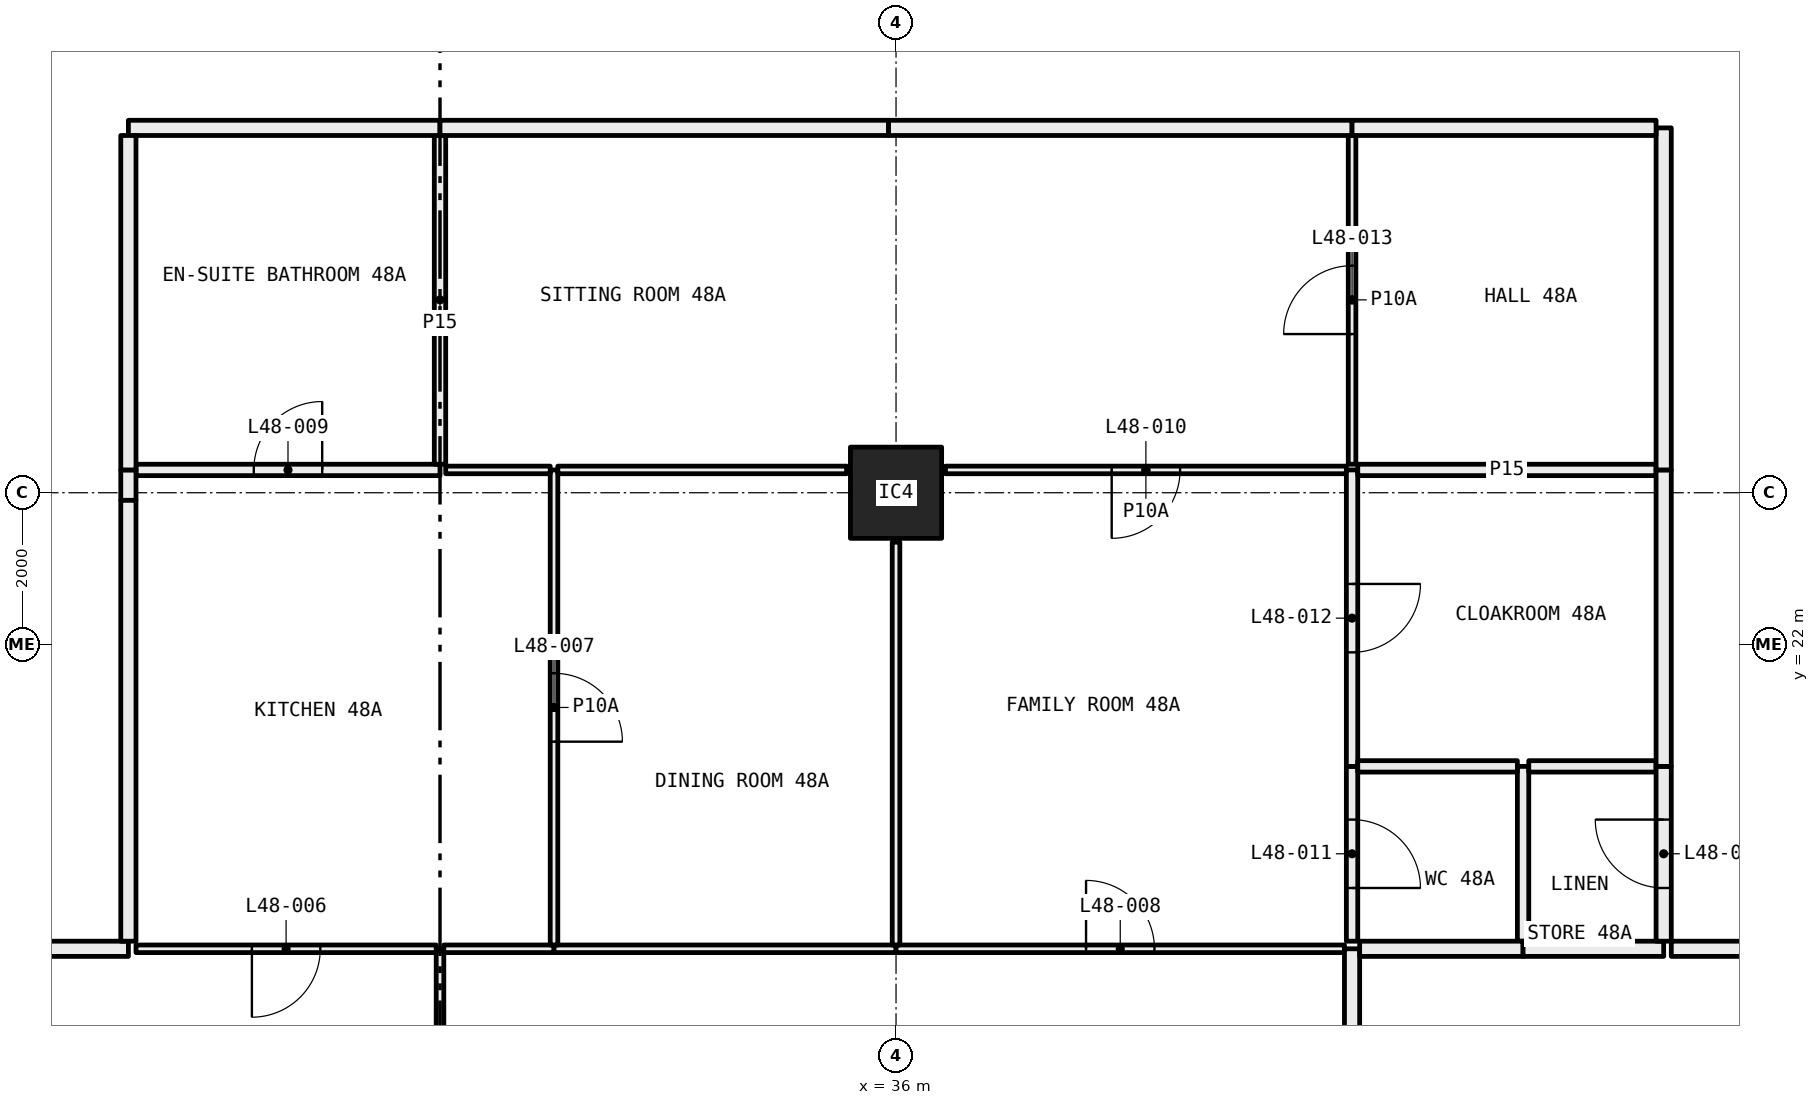
"""IFC4 building model, lengths in metres.
Left out: names, types, materials, properties, quantities, classifications, styles, units other than length and angle.
Written with IfcOpenShell. Run it as: python <this file> out.ifc"""

import sys

from ifc_helpers import new_model, si_unit, direction, frame, frame_2d, origin, origin_2d, place, context, subcontext, project, spatial, rectangle, hollow_rectangle, extrude, element, fill, save


model = new_model("IFC4")
c1 = context("Model", 3, precision=1e-05, world=origin(), true_north=direction((0.0, 1.0)))
c2 = subcontext(c1, "Body", "Model", "MODEL_VIEW")
j1 = project(units=[si_unit("LENGTHUNIT", "METRE"), si_unit("PLANEANGLEUNIT", "RADIAN")], contexts=[c1])
p1 = place(None, origin())
s1 = spatial("IfcSite", under=j1, at=p1, CompositionType="ELEMENT")
p2 = place(p1, origin())
s2 = spatial("IfcBuilding", under=s1, at=p2, CompositionType="ELEMENT")
p3 = place(p2, frame((0.0, 0.0, 182.4)))
s3 = spatial("IfcBuildingStorey", under=s2, at=p3, CompositionType="ELEMENT", Elevation=182.4)
p4 = place(p3, frame((36.0, 24.0, 0.0), z_axis=(0.0, 0.0, 1.0), x_axis=(1.0, 0.0, 0.0)))
e1 = element("IfcColumn", 1, at=p4, inside=s3, PredefinedType="COLUMN", context=c2, shape_type="SweptSolid", body=[
    extrude(hollow_rectangle(XDim=1.2, YDim=1.2, WallThickness=0.05, at=origin_2d()), origin(), (0.0, 0.0, 1.0), 3.05),
])
p5 = place(p3, frame((30.0, 12.72, 0.0), z_axis=(0.0, 0.0, 1.0), x_axis=(0.0, 1.0, 0.0)))
e2 = element("IfcWall", 2, at=p5, inside=s3, PredefinedType="PARTITIONING", context=c2, shape_type="SweptSolid", body=[
    extrude(rectangle(XDim=5.28, YDim=0.1, at=frame_2d((2.64, 0.0))), origin(), (0.0, 0.0, 1.0), 3.05),
])
p6 = place(p5, frame((2.19, 0.0, 0.0)))
e3 = element("IfcOpeningElement", 3, at=p6, cuts=e2, PredefinedType="OPENING", context=c2, shape_type="SweptSolid", body=[
    extrude(rectangle(XDim=0.9, YDim=2.1, at=frame_2d((0.45, 1.05))), frame((0.0, 0.06, 0.0), z_axis=(0.0, -1.0, 0.0), x_axis=(1.0, 0.0, 0.0)), (0.0, 0.0, 1.0), 0.12),
])
p7 = place(p3, frame((29.95, 18.0, 0.0), z_axis=(0.0, 0.0, 1.0), x_axis=(-1.0, 0.0, 0.0)))
e4 = element("IfcWall", 4, at=p7, inside=s3, PredefinedType="PARTITIONING", context=c2, shape_type="SweptSolid", body=[
    extrude(rectangle(XDim=3.95, YDim=0.1, at=frame_2d((1.975, 0.0))), origin(), (0.0, 0.0, 1.0), 3.05),
])
p8 = place(p7, frame((1.525, 0.0, 0.0)))
e5 = element("IfcOpeningElement", 5, at=p8, cuts=e4, PredefinedType="OPENING", context=c2, shape_type="SweptSolid", body=[
    extrude(rectangle(XDim=0.9, YDim=2.1, at=frame_2d((0.45, 1.05))), frame((0.0, 0.06, 0.0), z_axis=(0.0, -1.0, 0.0), x_axis=(1.0, 0.0, 0.0)), (0.0, 0.0, 1.0), 0.12),
])
p9 = place(p3, frame((25.9, 18.0, 0.0), z_axis=(0.0, 0.0, 1.0), x_axis=(-1.0, 0.0, 0.0)))
e6 = element("IfcWall", 6, at=p9, inside=s3, PredefinedType="PARTITIONING", context=c2, shape_type="SweptSolid", body=[
    extrude(rectangle(XDim=1.9, YDim=0.2, at=frame_2d((0.95, 0.0))), origin(), (0.0, 0.0, 1.0), 3.05),
])
p10 = place(p3, frame((31.5, 18.0, 0.0), z_axis=(0.0, 0.0, 1.0), x_axis=(-1.0, 0.0, 0.0)))
e7 = element("IfcWall", 7, at=p10, inside=s3, PredefinedType="PARTITIONING", context=c2, shape_type="SweptSolid", body=[
    extrude(rectangle(XDim=1.45, YDim=0.1, at=frame_2d((0.725, 0.0))), origin(), (0.0, 0.0, 1.0), 3.05),
])
p11 = place(p3, frame((36.0, 18.0, 0.0), z_axis=(0.0, 0.0, 1.0), x_axis=(-1.0, 0.0, 0.0)))
e8 = element("IfcWall", 8, at=p11, inside=s3, PredefinedType="PARTITIONING", context=c2, shape_type="SweptSolid", body=[
    extrude(rectangle(XDim=4.5, YDim=0.1, at=frame_2d((2.25, 0.0))), origin(), (0.0, 0.0, 1.0), 2.45),
])
p12 = place(p3, frame((41.9, 18.0, 0.0), z_axis=(0.0, 0.0, 1.0), x_axis=(-1.0, 0.0, 0.0)))
e9 = element("IfcWall", 9, at=p12, inside=s3, PredefinedType="PARTITIONING", context=c2, shape_type="SweptSolid", body=[
    extrude(rectangle(XDim=5.9, YDim=0.1, at=frame_2d((2.95, 0.0))), origin(), (0.0, 0.0, 1.0), 2.45),
])
p13 = place(p12, frame((2.5, 0.0, 0.0)))
e10 = element("IfcOpeningElement", 10, at=p13, cuts=e9, PredefinedType="OPENING", context=c2, shape_type="SweptSolid", body=[
    extrude(rectangle(XDim=0.9, YDim=2.1, at=frame_2d((0.45, 1.05))), frame((0.0, 0.06, 0.0), z_axis=(0.0, -1.0, 0.0), x_axis=(1.0, 0.0, 0.0)), (0.0, 0.0, 1.0), 0.12),
])
p14 = place(p3, frame((42.0, 12.72, 0.0), z_axis=(0.0, 0.0, 1.0), x_axis=(0.0, 1.0, 0.0)))
e11 = element("IfcWall", 11, at=p14, inside=s3, PredefinedType="PARTITIONING", context=c2, shape_type="SweptSolid", body=[
    extrude(rectangle(XDim=5.28, YDim=0.2, at=frame_2d((2.64, 0.0))), origin(), (0.0, 0.0, 1.0), 3.05),
])
p15 = place(p3, frame((31.5, 18.05, 0.0), z_axis=(0.0, 0.0, 1.0), x_axis=(0.0, 1.0, 0.0)))
e12 = element("IfcWall", 12, at=p15, inside=s3, PredefinedType="PARTITIONING", context=c2, shape_type="SweptSolid", body=[
    extrude(rectangle(XDim=6.25, YDim=0.1, at=frame_2d((3.125, 0.0))), origin(), (0.0, 0.0, 1.0), 2.45),
])
p16 = place(p15, frame((2.675, 0.0, 0.0)))
e13 = element("IfcOpeningElement", 13, at=p16, cuts=e12, PredefinedType="OPENING", context=c2, shape_type="SweptSolid", body=[
    extrude(rectangle(XDim=0.9, YDim=2.1, at=frame_2d((0.45, 1.05))), frame((0.0, 0.06, 0.0), z_axis=(0.0, -1.0, 0.0), x_axis=(1.0, 0.0, 0.0)), (0.0, 0.0, 1.0), 0.12),
])
p17 = place(p3, frame((30.0, 24.3, 0.0), z_axis=(0.0, 0.0, 1.0), x_axis=(-1.0, 0.0, 0.0)))
e14 = element("IfcWall", 14, at=p17, inside=s3, PredefinedType="PARTITIONING", context=c2, shape_type="SweptSolid", body=[
    extrude(rectangle(XDim=4.0, YDim=0.15, at=frame_2d((2.0, 0.0))), origin(), (0.0, 0.0, 1.0), 3.05),
])
p18 = place(p17, frame((1.55, 0.0, 0.0)))
e15 = element("IfcOpeningElement", 15, at=p18, cuts=e14, PredefinedType="OPENING", context=c2, shape_type="SweptSolid", body=[
    extrude(rectangle(XDim=0.9, YDim=2.1, at=frame_2d((0.45, 1.05))), frame((0.0, 0.085, 0.0), z_axis=(0.0, -1.0, 0.0), x_axis=(1.0, 0.0, 0.0)), (0.0, 0.0, 1.0), 0.17),
])
p19 = place(p3, frame((31.45, 24.3, 0.0), z_axis=(0.0, 0.0, 1.0), x_axis=(-1.0, 0.0, 0.0)))
e16 = element("IfcWall", 16, at=p19, inside=s3, PredefinedType="PARTITIONING", context=c2, shape_type="SweptSolid", body=[
    extrude(rectangle(XDim=1.375, YDim=0.1, at=frame_2d((0.688, 0.0))), origin(), (0.0, 0.0, 1.0), 3.05),
])
p20 = place(p3, frame((25.9, 24.3, 0.0), z_axis=(0.0, 0.0, 1.0), x_axis=(0.0, -1.0, 0.0)))
e17 = element("IfcWall", 17, at=p20, inside=s3, PredefinedType="PARTITIONING", context=c2, shape_type="SweptSolid", body=[
    extrude(rectangle(XDim=0.4, YDim=0.2, at=frame_2d((0.2, 0.0))), origin(), (0.0, 0.0, 1.0), 2.45),
])
p21 = place(p3, frame((25.9, 23.9, 0.0), z_axis=(0.0, 0.0, 1.0), x_axis=(0.0, -1.0, 0.0)))
e18 = element("IfcWall", 18, at=p21, inside=s3, PredefinedType="PARTITIONING", context=c2, shape_type="SweptSolid", body=[
    extrude(rectangle(XDim=5.8, YDim=0.2, at=frame_2d((2.9, 0.0))), origin(), (0.0, 0.0, 1.0), 3.05),
])
p22 = place(p3, frame((36.0, 18.05, 0.0), z_axis=(0.0, 0.0, 1.0), x_axis=(0.0, 1.0, 0.0)))
e19 = element("IfcWall", 19, at=p22, inside=s3, PredefinedType="PARTITIONING", context=c2, shape_type="SweptSolid", body=[
    extrude(rectangle(XDim=5.3, YDim=0.1, at=frame_2d((2.65, 0.0))), origin(), (0.0, 0.0, 1.0), 2.45),
])
p23 = place(p3, frame((35.35, 24.3, 0.0), z_axis=(0.0, 0.0, 1.0), x_axis=(-1.0, 0.0, 0.0)))
e20 = element("IfcWall", 20, at=p23, inside=s3, PredefinedType="PARTITIONING", context=c2, shape_type="SweptSolid", body=[
    extrude(rectangle(XDim=3.8, YDim=0.1, at=frame_2d((1.9, 0.0))), origin(), (0.0, 0.0, 1.0), 3.05),
])
p24 = place(p3, frame((41.925, 24.3, 0.0), z_axis=(0.0, 0.0, 1.0), x_axis=(-1.0, 0.0, 0.0)))
e21 = element("IfcWall", 21, at=p24, inside=s3, PredefinedType="PARTITIONING", context=c2, shape_type="SweptSolid", body=[
    extrude(rectangle(XDim=5.275, YDim=0.1, at=frame_2d((2.638, 0.0))), origin(), (0.0, 0.0, 1.0), 3.05),
])
p25 = place(p24, frame((2.188, 0.0, 0.0)))
e22 = element("IfcOpeningElement", 22, at=p25, cuts=e21, PredefinedType="OPENING", context=c2, shape_type="SweptSolid", body=[
    extrude(rectangle(XDim=0.9, YDim=2.1, at=frame_2d((0.45, 1.05))), frame((0.0, 0.06, 0.0), z_axis=(0.0, -1.0, 0.0), x_axis=(1.0, 0.0, 0.0)), (0.0, 0.0, 1.0), 0.12),
])
p26 = place(p3, frame((42.0, 18.1, 0.0), z_axis=(0.0, 0.0, 1.0), x_axis=(0.0, 1.0, 0.0)))
e23 = element("IfcWall", 23, at=p26, inside=s3, PredefinedType="PARTITIONING", context=c2, shape_type="SweptSolid", body=[
    extrude(rectangle(XDim=2.3, YDim=0.15, at=frame_2d((1.15, 0.0))), origin(), (0.0, 0.0, 1.0), 3.05),
])
p27 = place(p26, frame((0.7, 0.0, 0.0)))
e24 = element("IfcOpeningElement", 24, at=p27, cuts=e23, PredefinedType="OPENING", context=c2, shape_type="SweptSolid", body=[
    extrude(rectangle(XDim=0.9, YDim=2.1, at=frame_2d((0.45, 1.05))), frame((0.0, 0.085, 0.0), z_axis=(0.0, -1.0, 0.0), x_axis=(1.0, 0.0, 0.0)), (0.0, 0.0, 1.0), 0.17),
])
p28 = place(p3, frame((42.0, 20.4, 0.0), z_axis=(0.0, 0.0, 1.0), x_axis=(0.0, 1.0, 0.0)))
e25 = element("IfcWall", 25, at=p28, inside=s3, PredefinedType="PARTITIONING", context=c2, shape_type="SweptSolid", body=[
    extrude(rectangle(XDim=3.9, YDim=0.15, at=frame_2d((1.95, 0.0))), origin(), (0.0, 0.0, 1.0), 2.45),
])
p29 = place(p28, frame((1.5, 0.0, 0.0)))
e26 = element("IfcOpeningElement", 26, at=p29, cuts=e25, PredefinedType="OPENING", context=c2, shape_type="SweptSolid", body=[
    extrude(rectangle(XDim=0.9, YDim=2.1, at=frame_2d((0.45, 1.05))), frame((0.0, 0.085, 0.0), z_axis=(0.0, -1.0, 0.0), x_axis=(1.0, 0.0, 0.0)), (0.0, 0.0, 1.0), 0.17),
])
p30 = place(p3, frame((30.0, 24.375, 0.0), z_axis=(0.0, 0.0, 1.0), x_axis=(0.0, 1.0, 0.0)))
e27 = element("IfcWall", 27, at=p30, inside=s3, PredefinedType="PARTITIONING", context=c2, shape_type="SweptSolid", body=[
    extrude(rectangle(XDim=4.325, YDim=0.15, at=frame_2d((2.163, 0.0))), origin(), (0.0, 0.0, 1.0), 3.05),
])
p31 = place(p3, frame((30.0, 28.8, 0.0), z_axis=(0.0, 0.0, 1.0), x_axis=(-1.0, 0.0, 0.0)))
e28 = element("IfcWall", 28, at=p31, inside=s3, PredefinedType="PARTITIONING", context=c2, shape_type="SweptSolid", body=[
    extrude(rectangle(XDim=4.1, YDim=0.2, at=frame_2d((2.05, 0.0))), origin(), (0.0, 0.0, 1.0), 3.05),
])
p32 = place(p3, frame((25.9, 28.7, 0.0), z_axis=(0.0, 0.0, 1.0), x_axis=(0.0, -1.0, 0.0)))
e29 = element("IfcWall", 29, at=p32, inside=s3, PredefinedType="PARTITIONING", context=c2, shape_type="SweptSolid", body=[
    extrude(rectangle(XDim=4.4, YDim=0.2, at=frame_2d((2.2, 0.0))), origin(), (0.0, 0.0, 1.0), 3.05),
])
p33 = place(p3, frame((42.0, 24.375, 0.0), z_axis=(0.0, 0.0, 1.0), x_axis=(0.0, 1.0, 0.0)))
e30 = element("IfcWall", 30, at=p33, inside=s3, PredefinedType="PARTITIONING", context=c2, shape_type="SweptSolid", body=[
    extrude(rectangle(XDim=4.325, YDim=0.1, at=frame_2d((2.163, 0.0))), origin(), (0.0, 0.0, 1.0), 3.05),
])
p34 = place(p33, frame((1.712, 0.0, 0.0)))
e31 = element("IfcOpeningElement", 31, at=p34, cuts=e30, PredefinedType="OPENING", context=c2, shape_type="SweptSolid", body=[
    extrude(rectangle(XDim=0.9, YDim=2.1, at=frame_2d((0.45, 1.05))), frame((0.0, 0.06, 0.0), z_axis=(0.0, -1.0, 0.0), x_axis=(1.0, 0.0, 0.0)), (0.0, 0.0, 1.0), 0.12),
])
p35 = place(p3, frame((42.0, 28.8, 0.0), z_axis=(0.0, 0.0, 1.0), x_axis=(-1.0, 0.0, 0.0)))
e32 = element("IfcWall", 32, at=p35, inside=s3, PredefinedType="PARTITIONING", context=c2, shape_type="SweptSolid", body=[
    extrude(rectangle(XDim=6.1, YDim=0.2, at=frame_2d((3.05, 0.0))), origin(), (0.0, 0.0, 1.0), 2.45),
])
p36 = place(p3, frame((35.9, 28.8, 0.0), z_axis=(0.0, 0.0, 1.0), x_axis=(-1.0, 0.0, 0.0)))
e33 = element("IfcWall", 33, at=p36, inside=s3, PredefinedType="PARTITIONING", context=c2, shape_type="SweptSolid", body=[
    extrude(rectangle(XDim=5.9, YDim=0.2, at=frame_2d((2.95, 0.0))), origin(), (0.0, 0.0, 1.0), 3.05),
])
p37 = place(p3, frame((44.25, 18.1, 0.0), z_axis=(0.0, 0.0, 1.0), x_axis=(0.0, 1.0, 0.0)))
e34 = element("IfcWall", 34, at=p37, inside=s3, PredefinedType="PARTITIONING", context=c2, shape_type="SweptSolid", body=[
    extrude(rectangle(XDim=2.3, YDim=0.15, at=frame_2d((1.15, 0.0))), origin(), (0.0, 0.0, 1.0), 3.05),
])
p38 = place(p3, frame((44.175, 20.4, 0.0), z_axis=(0.0, 0.0, 1.0), x_axis=(-1.0, 0.0, 0.0)))
e35 = element("IfcWall", 35, at=p38, inside=s3, PredefinedType="PARTITIONING", context=c2, shape_type="SweptSolid", body=[
    extrude(rectangle(XDim=2.1, YDim=0.15, at=frame_2d((1.05, 0.0))), origin(), (0.0, 0.0, 1.0), 3.05),
])
p39 = place(p3, frame((42.1, 18.0, 0.0), z_axis=(0.0, 0.0, 1.0), x_axis=(1.0, 0.0, 0.0)))
e36 = element("IfcWall", 36, at=p39, inside=s3, PredefinedType="PARTITIONING", context=c2, shape_type="SweptSolid", body=[
    extrude(rectangle(XDim=2.15, YDim=0.2, at=frame_2d((1.075, 0.0))), origin(), (0.0, 0.0, 1.0), 3.05),
])
p40 = place(p3, frame((46.0, 20.4, 0.0), z_axis=(0.0, 0.0, 1.0), x_axis=(-1.0, 0.0, 0.0)))
e37 = element("IfcWall", 37, at=p40, inside=s3, PredefinedType="PARTITIONING", context=c2, shape_type="SweptSolid", body=[
    extrude(rectangle(XDim=1.675, YDim=0.15, at=frame_2d((0.837, 0.0))), origin(), (0.0, 0.0, 1.0), 3.05),
])
p41 = place(p3, frame((44.25, 18.0, 0.0), z_axis=(0.0, 0.0, 1.0), x_axis=(1.0, 0.0, 0.0)))
e38 = element("IfcWall", 38, at=p41, inside=s3, PredefinedType="PARTITIONING", context=c2, shape_type="SweptSolid", body=[
    extrude(rectangle(XDim=1.85, YDim=0.2, at=frame_2d((0.925, 0.0))), origin(), (0.0, 0.0, 1.0), 3.05),
])
p42 = place(p3, frame((46.1, 18.1, 0.0), z_axis=(0.0, 0.0, 1.0), x_axis=(0.0, 1.0, 0.0)))
e39 = element("IfcWall", 39, at=p42, inside=s3, PredefinedType="PARTITIONING", context=c2, shape_type="SweptSolid", body=[
    extrude(rectangle(XDim=2.3, YDim=0.2, at=frame_2d((1.15, 0.0))), origin(), (0.0, 0.0, 1.0), 3.05),
])
p43 = place(p42, frame((0.7, 0.0, 0.0)))
e40 = element("IfcOpeningElement", 40, at=p43, cuts=e39, PredefinedType="OPENING", context=c2, shape_type="SweptSolid", body=[
    extrude(rectangle(XDim=0.9, YDim=2.1, at=frame_2d((0.45, 1.05))), frame((0.0, 0.11, 0.0), z_axis=(0.0, -1.0, 0.0), x_axis=(1.0, 0.0, 0.0)), (0.0, 0.0, 1.0), 0.22),
])
p44 = place(p3, frame((46.0, 24.3, 0.0), z_axis=(0.0, 0.0, 1.0), x_axis=(-1.0, 0.0, 0.0)))
e41 = element("IfcWall", 41, at=p44, inside=s3, PredefinedType="PARTITIONING", context=c2, shape_type="SweptSolid", body=[
    extrude(rectangle(XDim=3.925, YDim=0.15, at=frame_2d((1.962, 0.0))), origin(), (0.0, 0.0, 1.0), 3.05),
])
p45 = place(p3, frame((46.1, 20.4, 0.0), z_axis=(0.0, 0.0, 1.0), x_axis=(0.0, 1.0, 0.0)))
e42 = element("IfcWall", 42, at=p45, inside=s3, PredefinedType="PARTITIONING", context=c2, shape_type="SweptSolid", body=[
    extrude(rectangle(XDim=3.9, YDim=0.2, at=frame_2d((1.95, 0.0))), origin(), (0.0, 0.0, 1.0), 2.45),
])
p46 = place(p3, frame((46.1, 24.3, 0.0), z_axis=(0.0, 0.0, 1.0), x_axis=(0.0, 1.0, 0.0)))
e43 = element("IfcWall", 43, at=p46, inside=s3, PredefinedType="PARTITIONING", context=c2, shape_type="SweptSolid", body=[
    extrude(rectangle(XDim=4.5, YDim=0.2, at=frame_2d((2.25, 0.0))), origin(), (0.0, 0.0, 1.0), 3.05),
])
p47 = place(p3, frame((46.0, 28.8, 0.0), z_axis=(0.0, 0.0, 1.0), x_axis=(-1.0, 0.0, 0.0)))
e44 = element("IfcWall", 44, at=p47, inside=s3, PredefinedType="PARTITIONING", context=c2, shape_type="SweptSolid", body=[
    extrude(rectangle(XDim=4.0, YDim=0.2, at=frame_2d((2.0, 0.0))), origin(), (0.0, 0.0, 1.0), 3.05),
])
p48 = place(p3, frame((53.28, 18.0, 0.0), z_axis=(0.0, 0.0, 1.0), x_axis=(-1.0, 0.0, 0.0)))
e45 = element("IfcWall", 45, at=p48, inside=s3, PredefinedType="PARTITIONING", context=c2, shape_type="SweptSolid", body=[
    extrude(rectangle(XDim=7.08, YDim=0.2, at=frame_2d((3.54, 0.0))), origin(), (0.0, 0.0, 1.0), 3.05),
])
p49 = place(p48, frame((3.09, 0.0, 0.0)))
e46 = element("IfcOpeningElement", 46, at=p49, cuts=e45, PredefinedType="OPENING", context=c2, shape_type="SweptSolid", body=[
    extrude(rectangle(XDim=0.9, YDim=2.1, at=frame_2d((0.45, 1.05))), frame((0.0, 0.11, 0.0), z_axis=(0.0, -1.0, 0.0), x_axis=(1.0, 0.0, 0.0)), (0.0, 0.0, 1.0), 0.22),
])
p50 = place(p8, origin())
e47 = element("IfcDoor", 47, at=p50, inside=s3, OperationType="SINGLE_SWING_LEFT", PredefinedType="DOOR", context=c2, shape_type="SweptSolid", body=[
    extrude(rectangle(XDim=0.9, YDim=2.1, at=frame_2d((0.45, 1.05))), frame((0.0, 0.025, 0.0), z_axis=(0.0, -1.0, 0.0), x_axis=(1.0, 0.0, 0.0)), (0.0, 0.0, 1.0), 0.05),
])
fill(e5, e47)
p51 = place(p16, frame((0.9, 0.0, 0.0), x_axis=(-1.0, 0.0, 0.0)))
e48 = element("IfcDoor", 48, at=p51, inside=s3, OperationType="SINGLE_SWING_LEFT", PredefinedType="DOOR", context=c2, shape_type="SweptSolid", body=[
    extrude(rectangle(XDim=0.9, YDim=2.1, at=frame_2d((0.45, 1.05))), frame((0.0, 0.025, 0.0), z_axis=(0.0, -1.0, 0.0), x_axis=(1.0, 0.0, 0.0)), (0.0, 0.0, 1.0), 0.05),
])
fill(e13, e48)
p52 = place(p13, frame((0.9, 0.0, 0.0), x_axis=(-1.0, 0.0, 0.0)))
e49 = element("IfcDoor", 49, at=p52, inside=s3, OperationType="SINGLE_SWING_RIGHT", PredefinedType="DOOR", context=c2, shape_type="SweptSolid", body=[
    extrude(rectangle(XDim=0.9, YDim=2.1, at=frame_2d((0.45, 1.05))), frame((0.0, 0.025, 0.0), z_axis=(0.0, -1.0, 0.0), x_axis=(1.0, 0.0, 0.0)), (0.0, 0.0, 1.0), 0.05),
])
fill(e10, e49)
p53 = place(p18, frame((0.9, 0.0, 0.0), x_axis=(-1.0, 0.0, 0.0)))
e50 = element("IfcDoor", 50, at=p53, inside=s3, OperationType="SINGLE_SWING_LEFT", PredefinedType="DOOR", context=c2, shape_type="SweptSolid", body=[
    extrude(rectangle(XDim=0.9, YDim=2.1, at=frame_2d((0.45, 1.05))), frame((0.0, 0.025, 0.0), z_axis=(0.0, -1.0, 0.0), x_axis=(1.0, 0.0, 0.0)), (0.0, 0.0, 1.0), 0.05),
])
fill(e15, e50)
p54 = place(p25, origin())
e51 = element("IfcDoor", 51, at=p54, inside=s3, OperationType="SINGLE_SWING_LEFT", PredefinedType="DOOR", context=c2, shape_type="SweptSolid", body=[
    extrude(rectangle(XDim=0.9, YDim=2.1, at=frame_2d((0.45, 1.05))), frame((0.0, 0.025, 0.0), z_axis=(0.0, -1.0, 0.0), x_axis=(1.0, 0.0, 0.0)), (0.0, 0.0, 1.0), 0.05),
])
fill(e22, e51)
p55 = place(p27, frame((0.9, 0.0, 0.0), x_axis=(-1.0, 0.0, 0.0)))
e52 = element("IfcDoor", 52, at=p55, inside=s3, OperationType="SINGLE_SWING_LEFT", PredefinedType="DOOR", context=c2, shape_type="SweptSolid", body=[
    extrude(rectangle(XDim=0.9, YDim=2.1, at=frame_2d((0.45, 1.05))), frame((0.0, 0.025, 0.0), z_axis=(0.0, -1.0, 0.0), x_axis=(1.0, 0.0, 0.0)), (0.0, 0.0, 1.0), 0.05),
])
fill(e24, e52)
p56 = place(p29, frame((0.9, 0.0, 0.0), x_axis=(-1.0, 0.0, 0.0)))
e53 = element("IfcDoor", 53, at=p56, inside=s3, OperationType="SINGLE_SWING_RIGHT", PredefinedType="DOOR", context=c2, shape_type="SweptSolid", body=[
    extrude(rectangle(XDim=0.9, YDim=2.1, at=frame_2d((0.45, 1.05))), frame((0.0, 0.025, 0.0), z_axis=(0.0, -1.0, 0.0), x_axis=(1.0, 0.0, 0.0)), (0.0, 0.0, 1.0), 0.05),
])
fill(e26, e53)
p57 = place(p34, origin())
e54 = element("IfcDoor", 54, at=p57, inside=s3, OperationType="SINGLE_SWING_RIGHT", PredefinedType="DOOR", context=c2, shape_type="SweptSolid", body=[
    extrude(rectangle(XDim=0.9, YDim=2.1, at=frame_2d((0.45, 1.05))), frame((0.0, 0.025, 0.0), z_axis=(0.0, -1.0, 0.0), x_axis=(1.0, 0.0, 0.0)), (0.0, 0.0, 1.0), 0.05),
])
fill(e31, e54)
p58 = place(p43, origin())
e55 = element("IfcDoor", 55, at=p58, inside=s3, OperationType="SINGLE_SWING_LEFT", PredefinedType="DOOR", context=c2, shape_type="SweptSolid", body=[
    extrude(rectangle(XDim=0.9, YDim=2.1, at=frame_2d((0.45, 1.05))), frame((0.0, 0.025, 0.0), z_axis=(0.0, -1.0, 0.0), x_axis=(1.0, 0.0, 0.0)), (0.0, 0.0, 1.0), 0.05),
])
fill(e40, e55)
save(model, sys.argv[1])
